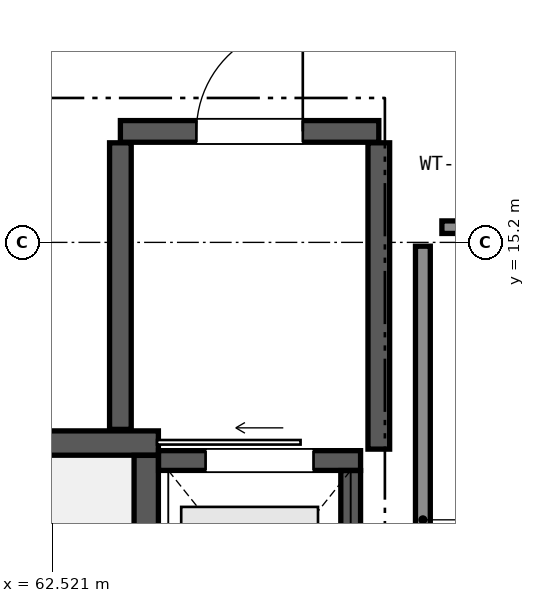
"""IFC4 building model, lengths in metres.
Left out: names, types, materials, properties, quantities, classifications, styles, units other than length and angle.
Written with IfcOpenShell. Run it as: python <this file> out.ifc"""

import sys

from ifc_helpers import new_model, si_unit, direction, frame, frame_2d, origin, place, context, subcontext, project, spatial, rectangle, extrude, element, fill, save


model = new_model("IFC4")
c1 = context("Model", 3, precision=1e-05, world=origin(), true_north=direction((0.0, 1.0)))
c2 = subcontext(c1, "Body", "Model", "MODEL_VIEW")
j1 = project(units=[si_unit("LENGTHUNIT", "METRE"), si_unit("PLANEANGLEUNIT", "RADIAN")], contexts=[c1])
p1 = place(None, origin())
s1 = spatial("IfcSite", under=j1, at=p1, CompositionType="ELEMENT")
p2 = place(p1, origin())
s2 = spatial("IfcBuilding", under=s1, at=p2, CompositionType="ELEMENT")
p3 = place(p2, frame((0.0, 0.0, -4.42)))
s3 = spatial("IfcBuildingStorey", under=s2, at=p3, CompositionType="ELEMENT", Elevation=-4.42)
p4 = place(p3, frame((55.48, 12.56, 0.0), z_axis=(0.0, 0.0, 1.0), x_axis=(1.0, 0.0, 0.0)))
e1 = element("IfcWall", 1, at=p4, inside=s3, PredefinedType="SHEAR", context=c2, shape_type="SweptSolid", body=[
    extrude(rectangle(XDim=8.44, YDim=0.32, at=frame_2d((4.22, 0.0))), origin(), (0.0, 0.0, 1.0), 4.09),
])
p5 = place(p4, frame((0.57, 0.0, 0.0)))
e2 = element("IfcOpeningElement", 2, at=p5, cuts=e1, PredefinedType="OPENING", context=c2, shape_type="SweptSolid", body=[
    extrude(rectangle(XDim=1.2, YDim=2.2, at=frame_2d((0.6, 1.1))), frame((0.0, 0.17, 0.0), z_axis=(0.0, -1.0, 0.0), x_axis=(1.0, 0.0, 0.0)), (0.0, 0.0, 1.0), 0.34),
])
p6 = place(p3, frame((63.76, 9.002, 0.0), z_axis=(0.0, 0.0, 1.0), x_axis=(0.0, 1.0, 0.0)))
e3 = element("IfcWall", 3, at=p6, inside=s3, PredefinedType="SHEAR", context=c2, shape_type="SweptSolid", body=[
    extrude(rectangle(XDim=3.396, YDim=0.32, at=frame_2d((1.698, 0.0))), origin(), (0.0, 0.0, 1.0), 4.09),
])
p7 = place(p3, frame((63.922, 12.33, 0.0), z_axis=(0.0, 0.0, 1.0), x_axis=(1.0, 0.0, 0.0)))
e4 = element("IfcWall", 4, at=p7, inside=s3, PredefinedType="SHEAR", context=c2, shape_type="SweptSolid", body=[
    extrude(rectangle(XDim=2.658, YDim=0.26, at=frame_2d((1.329, 0.0))), origin(), (0.0, 0.0, 1.0), 4.09),
])
p8 = place(p7, frame((0.619, 0.0, 0.0)))
e5 = element("IfcOpeningElement", 5, at=p8, cuts=e4, PredefinedType="OPENING", context=c2, shape_type="SweptSolid", body=[
    extrude(rectangle(XDim=1.42, YDim=2.25, at=frame_2d((0.71, 1.125))), frame((0.0, 0.14, 0.0), z_axis=(0.0, -1.0, 0.0), x_axis=(1.0, 0.0, 0.0)), (0.0, 0.0, 1.0), 0.28),
])
p9 = place(p3, frame((66.45, 9.202, 0.0), z_axis=(0.0, 0.0, 1.0), x_axis=(0.0, 1.0, 0.0)))
e6 = element("IfcWall", 6, at=p9, inside=s3, PredefinedType="SHEAR", context=c2, shape_type="SweptSolid", body=[
    extrude(rectangle(XDim=2.996, YDim=0.26, at=frame_2d((1.498, 0.0))), origin(), (0.0, 0.0, 1.0), 4.09),
])
p10 = place(p3, frame((63.42, 16.66, 0.0), z_axis=(0.0, 0.0, 1.0), x_axis=(1.0, 0.0, 0.0)))
e7 = element("IfcWall", 7, at=p10, inside=s3, PredefinedType="SHEAR", context=c2, shape_type="SweptSolid", body=[
    extrude(rectangle(XDim=3.4, YDim=0.285, at=frame_2d((1.7, 0.0))), origin(), (0.0, 0.0, 1.0), 4.09),
])
p11 = place(p10, frame((1.0, 0.0, 0.0)))
e8 = element("IfcOpeningElement", 8, at=p11, cuts=e7, PredefinedType="OPENING", context=c2, shape_type="SweptSolid", body=[
    extrude(rectangle(XDim=1.4, YDim=2.25, at=frame_2d((0.7, 1.125))), frame((0.0, 0.152, 0.0), z_axis=(0.0, -1.0, 0.0), x_axis=(1.0, 0.0, 0.0)), (0.0, 0.0, 1.0), 0.305),
])
p12 = place(p3, frame((63.42, 12.74, 0.0), z_axis=(0.0, 0.0, 1.0), x_axis=(0.0, 1.0, 0.0)))
e9 = element("IfcWall", 9, at=p12, inside=s3, PredefinedType="SHEAR", context=c2, shape_type="SweptSolid", body=[
    extrude(rectangle(XDim=3.77, YDim=0.285, at=frame_2d((1.885, 0.0))), origin(), (0.0, 0.0, 1.0), 3.54),
])
p13 = place(p3, frame((66.82, 12.48, 0.0), z_axis=(0.0, 0.0, 1.0), x_axis=(0.0, 1.0, 0.0)))
e10 = element("IfcWall", 10, at=p13, inside=s3, PredefinedType="SHEAR", context=c2, shape_type="SweptSolid", body=[
    extrude(rectangle(XDim=4.03, YDim=0.285, at=frame_2d((2.015, 0.0))), origin(), (0.0, 0.0, 1.0), 3.54),
])
p14 = place(p3, frame((67.65, 15.4, 0.0), z_axis=(0.0, 0.0, 1.0), x_axis=(1.0, 0.0, 0.0)))
e11 = element("IfcWall", 11, at=p14, inside=s3, PredefinedType="PARTITIONING", context=c2, shape_type="SweptSolid", body=[
    extrude(rectangle(XDim=6.7, YDim=0.165, at=frame_2d((3.35, 0.0))), origin(), (0.0, 0.0, 1.0), 3.54),
])
p15 = place(p14, frame((2.67, 0.0, 0.0)))
e12 = element("IfcOpeningElement", 12, at=p15, cuts=e11, PredefinedType="OPENING", context=c2, shape_type="SweptSolid", body=[
    extrude(rectangle(XDim=1.36, YDim=2.25, at=frame_2d((0.68, 1.125))), frame((0.0, 0.093, 0.0), z_axis=(0.0, -1.0, 0.0), x_axis=(1.0, 0.0, 0.0)), (0.0, 0.0, 1.0), 0.185),
])
p16 = place(p3, frame((67.4, 7.95, 0.0), z_axis=(0.0, 0.0, 1.0), x_axis=(0.0, 1.0, 0.0)))
e13 = element("IfcWall", 13, at=p16, inside=s3, PredefinedType="PARTITIONING", context=c2, shape_type="SweptSolid", body=[
    extrude(rectangle(XDim=7.2, YDim=0.195, at=frame_2d((3.6, 0.0))), origin(), (0.0, 0.0, 1.0), 3.54),
])
p17 = place(p8, origin())
e14 = element("IfcDoor", 14, at=p17, inside=s3, OperationType="SLIDING_TO_LEFT", PredefinedType="DOOR", context=c2, shape_type="SweptSolid", body=[
    extrude(rectangle(XDim=1.42, YDim=2.25, at=frame_2d((0.71, 1.125))), frame((0.0, 0.025, 0.0), z_axis=(0.0, -1.0, 0.0), x_axis=(1.0, 0.0, 0.0)), (0.0, 0.0, 1.0), 0.05),
])
fill(e5, e14)
p18 = place(p11, origin())
e15 = element("IfcDoor", 15, at=p18, inside=s3, OperationType="SINGLE_SWING_RIGHT", PredefinedType="DOOR", context=c2, shape_type="SweptSolid", body=[
    extrude(rectangle(XDim=1.4, YDim=2.25, at=frame_2d((0.7, 1.125))), frame((0.0, 0.025, 0.0), z_axis=(0.0, -1.0, 0.0), x_axis=(1.0, 0.0, 0.0)), (0.0, 0.0, 1.0), 0.05),
])
fill(e8, e15)
save(model, sys.argv[1])
